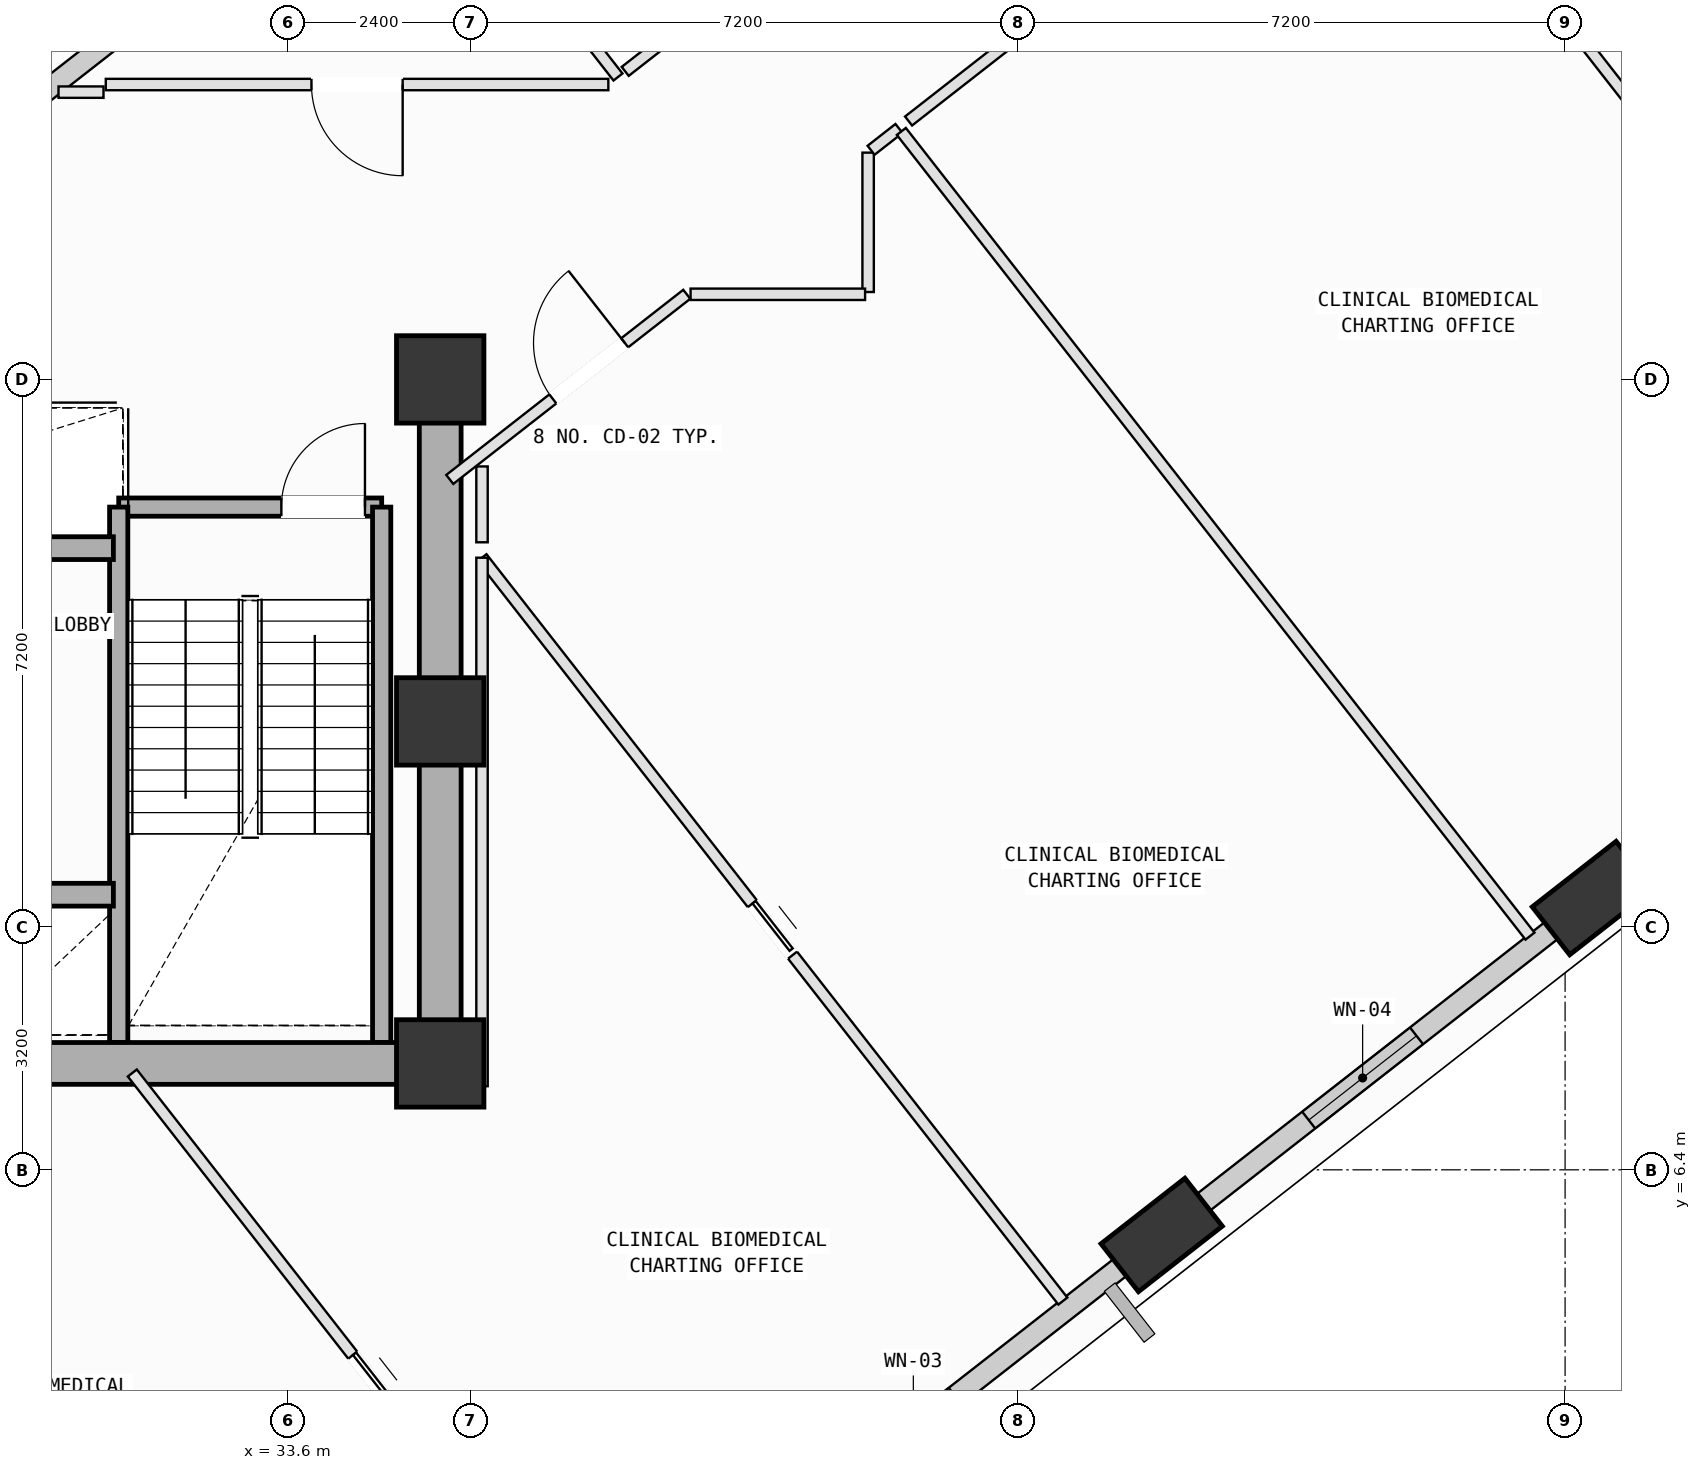
"""IFC4 building model, lengths in metres.
Left out: names, types, materials, properties, quantities, classifications, styles, units other than length and angle.
Written with IfcOpenShell. Run it as: python <this file> out.ifc"""

import sys

from ifc_helpers import new_model, si_unit, direction, frame, frame_2d, origin, origin_2d, place, context, subcontext, project, spatial, rectangle, extrude, element, fill, save


model = new_model("IFC4")
c1 = context("Model", 3, precision=1e-05, world=origin(), true_north=direction((0.0, 1.0)))
c2 = subcontext(c1, "Body", "Model", "MODEL_VIEW")
j1 = project(units=[si_unit("LENGTHUNIT", "METRE"), si_unit("PLANEANGLEUNIT", "RADIAN")], contexts=[c1])
p1 = place(None, origin())
s1 = spatial("IfcSite", under=j1, at=p1, CompositionType="ELEMENT")
p2 = place(p1, origin())
s2 = spatial("IfcBuilding", under=s1, at=p2, CompositionType="ELEMENT")
p3 = place(p2, frame((0.0, 0.0, 185.8)))
s3 = spatial("IfcBuildingStorey", under=s2, at=p3, CompositionType="ELEMENT", Elevation=185.8)
for number, where, z_axis, x_axis in (
    (1, (35.6, 7.8, 0.0), (0.0, 0.0, 1.0), (1.0, 0.0, 0.0)),
    (2, (35.6, 12.3, 0.0), (0.0, 0.0, 1.0), (1.0, 0.0, 0.0)),
    (3, (35.6, 16.8, 0.0), (0.0, 0.0, 1.0), (1.0, 0.0, 0.0)),
):
    element("IfcColumn", number, at=place(p3, frame(where, z_axis=z_axis, x_axis=x_axis)), inside=s3, PredefinedType="COLUMN", context=c2, shape_type="SweptSolid", body=[
        extrude(rectangle(XDim=1.15, YDim=1.15, at=origin_2d()), origin(), (0.0, 0.0, 1.0), 4.0),
    ])
p4 = place(p3, frame((45.092, 5.543, 0.002), z_axis=(0.079077438494, 0.048115579884, 0.99570660824), x_axis=(-0.933302489934, 0.35454015697, 0.056988940849)))
e4 = element("IfcColumn", 4, at=p4, inside=s3, PredefinedType="COLUMN", context=c2, shape_type="SweptSolid", body=[
    extrude(rectangle(XDim=1.4, YDim=0.8, at=origin_2d()), origin(), (0.0, 0.0, 1.0), 4.014),
])
p5 = place(p3, frame((50.766, 9.976, 0.002), z_axis=(0.060579626356, 0.071345282847, 0.995610345208), x_axis=(-0.997420646778, 0.042797849561, 0.057622890015)))
e5 = element("IfcColumn", 5, at=p5, inside=s3, PredefinedType="COLUMN", context=c2, shape_type="SweptSolid", body=[
    extrude(rectangle(XDim=1.4, YDim=0.8, at=origin_2d()), origin(), (0.0, 0.0, 1.0), 4.014),
])
p6 = place(p3, frame((44.847, 5.351, 0.0), z_axis=(0.0, 0.0, 1.0), x_axis=(-0.78801127006, -0.615660814294, 0.0)))
e6 = element("IfcWall", 6, at=p6, inside=s3, PredefinedType="SOLIDWALL", context=c2, shape_type="SweptSolid", body=[
    extrude(rectangle(XDim=6.214, YDim=0.28, at=frame_2d((3.107, 0.0))), origin(), (0.0, 0.0, 1.0), 3.265),
])
p7 = place(p6, frame((3.135, 0.0, 0.75)))
e7 = element("IfcOpeningElement", 7, at=p7, cuts=e6, PredefinedType="OPENING", context=c2, shape_type="SweptSolid", body=[
    extrude(rectangle(XDim=1.4, YDim=1.85, at=frame_2d((0.7, 0.925))), frame((0.0, 0.15, 0.0), z_axis=(0.0, -1.0, 0.0), x_axis=(1.0, 0.0, 0.0)), (0.0, 0.0, 1.0), 0.3),
])
p8 = place(p3, frame((50.521, 9.784, 0.0), z_axis=(0.0, 0.0, 1.0), x_axis=(-0.788024969853, -0.615643278927, 0.0)))
e8 = element("IfcWall", 8, at=p8, inside=s3, PredefinedType="SOLIDWALL", context=c2, shape_type="SweptSolid", body=[
    extrude(rectangle(XDim=6.209, YDim=0.28, at=frame_2d((3.104, 0.0))), origin(), (0.0, 0.0, 1.0), 3.265),
])
p9 = place(p8, frame((2.634, 0.0, 0.75)))
e9 = element("IfcOpeningElement", 9, at=p9, cuts=e8, PredefinedType="OPENING", context=c2, shape_type="SweptSolid", body=[
    extrude(rectangle(XDim=1.8, YDim=2.05, at=frame_2d((0.9, 1.025))), frame((0.0, 0.15, 0.0), z_axis=(0.0, -1.0, 0.0), x_axis=(1.0, 0.0, 0.0)), (0.0, 0.0, 1.0), 0.3),
])
p10 = place(p3, frame((29.667, 20.014, 0.0), z_axis=(0.0, 0.0, 1.0), x_axis=(0.788002637329, 0.615671863547, 0.0)))
e10 = element("IfcWall", 10, at=p10, inside=s3, PredefinedType="SOLIDWALL", context=c2, shape_type="SweptSolid", body=[
    extrude(rectangle(XDim=5.96, YDim=0.28, at=frame_2d((2.98, 0.0))), origin(), (0.0, 0.0, 1.0), 3.265),
])
p11 = place(p3, frame((31.37, 15.12, 0.0), z_axis=(0.0, 0.0, 1.0), x_axis=(1.0, 0.0, 0.0)))
e11 = element("IfcWall", 11, at=p11, inside=s3, PredefinedType="SOLIDWALL", context=c2, shape_type="SweptSolid", body=[
    extrude(rectangle(XDim=3.46, YDim=0.24, at=frame_2d((1.73, 0.0))), origin(), (0.0, 0.0, 1.0), 3.78),
])
p12 = place(p11, frame((2.14, 0.0, 0.0)))
e12 = element("IfcOpeningElement", 12, at=p12, cuts=e11, PredefinedType="OPENING", context=c2, shape_type="SweptSolid", body=[
    extrude(rectangle(XDim=1.1, YDim=2.15, at=frame_2d((0.55, 1.075))), frame((0.0, 0.13, 0.0), z_axis=(0.0, -1.0, 0.0), x_axis=(1.0, 0.0, 0.0)), (0.0, 0.0, 1.0), 0.26),
])
for number, where, z_axis, x_axis in (
    (13, (34.83, 15.12, 0.0), (0.0, 0.0, 1.0), (0.0, -1.0, 0.0)),
    (14, (31.37, 8.075, 0.0), (0.0, 0.0, 1.0), (0.0, 1.0, 0.0)),
):
    element("IfcWall", number, at=place(p3, frame(where, z_axis=z_axis, x_axis=x_axis)), inside=s3, PredefinedType="SOLIDWALL", context=c2, shape_type="SweptSolid", body=[
        extrude(rectangle(XDim=7.045, YDim=0.24, at=frame_2d((3.522, 0.0))), origin(), (0.0, 0.0, 1.0), 3.78),
    ])
p13 = place(p3, frame((24.8, 7.8, 0.0), z_axis=(0.0, 0.0, 1.0), x_axis=(1.0, 0.0, 0.0)))
e15 = element("IfcWall", 15, at=p13, inside=s3, PredefinedType="SHEAR", context=c2, shape_type="SweptSolid", body=[
    extrude(rectangle(XDim=10.8, YDim=0.55, at=frame_2d((5.4, 0.0))), origin(), (0.0, 0.0, 1.0), 3.78),
])
p14 = place(p3, frame((35.6, 7.8, 0.0), z_axis=(0.0, 0.0, 1.0), x_axis=(0.0, 1.0, 0.0)))
e16 = element("IfcWall", 16, at=p14, inside=s3, PredefinedType="SHEAR", context=c2, shape_type="SweptSolid", body=[
    extrude(rectangle(XDim=9.0, YDim=0.55, at=frame_2d((4.5, 0.0))), origin(), (0.0, 0.0, 1.0), 3.78),
])
p15 = place(p3, frame((29.6, 10.02, 0.0), z_axis=(0.0, 0.0, 1.0), x_axis=(1.0, 0.0, 0.0)))
e17 = element("IfcWall", 17, at=p15, inside=s3, PredefinedType="SOLIDWALL", context=c2, shape_type="SweptSolid", body=[
    extrude(rectangle(XDim=1.7, YDim=0.3, at=frame_2d((0.85, 0.0))), origin(), (0.0, 0.0, 1.0), 3.78),
])
p16 = place(p3, frame((25.85, 14.58, 0.0), z_axis=(0.0, 0.0, 1.0), x_axis=(1.0, 0.0, 0.0)))
e18 = element("IfcWall", 18, at=p16, inside=s3, PredefinedType="SOLIDWALL", context=c2, shape_type="SweptSolid", body=[
    extrude(rectangle(XDim=5.45, YDim=0.3, at=frame_2d((2.725, 0.0))), origin(), (0.0, 0.0, 1.0), 3.78),
])
p17 = place(p16, frame((0.34, 0.0, 0.0)))
e19 = element("IfcOpeningElement", 19, at=p17, cuts=e18, PredefinedType="OPENING", context=c2, shape_type="SweptSolid", body=[
    extrude(rectangle(XDim=1.12, YDim=2.15, at=frame_2d((0.56, 1.075))), frame((0.0, 0.16, 0.0), z_axis=(0.0, -1.0, 0.0), x_axis=(1.0, 0.0, 0.0)), (0.0, 0.0, 1.0), 0.32),
])
p18 = place(p16, frame((2.24, 0.0, 0.0)))
e20 = element("IfcOpeningElement", 20, at=p18, cuts=e18, PredefinedType="OPENING", context=c2, shape_type="SweptSolid", body=[
    extrude(rectangle(XDim=1.12, YDim=2.15, at=frame_2d((0.56, 1.075))), frame((0.0, 0.16, 0.0), z_axis=(0.0, -1.0, 0.0), x_axis=(1.0, 0.0, 0.0)), (0.0, 0.0, 1.0), 0.32),
])
p19 = place(p3, frame((31.625, -4.833, 0.0), z_axis=(0.0, 0.0, 1.0), x_axis=(-0.615629988963, 0.788035352436, 0.0)))
e21 = element("IfcWall", 21, at=p19, inside=s3, PredefinedType="PARTITIONING", context=c2, shape_type="SweptSolid", body=[
    extrude(rectangle(XDim=13.485, YDim=0.15, at=frame_2d((6.743, 0.0))), origin(), (0.0, 0.0, 1.0), 3.78),
])
p20 = place(p3, frame((31.549, 7.674, 0.0), z_axis=(0.0, 0.0, 1.0), x_axis=(0.615635907998, -0.788030728324, 0.0)))
e22 = element("IfcWall", 22, at=p20, inside=s3, PredefinedType="PARTITIONING", context=c2, shape_type="SweptSolid", body=[
    extrude(rectangle(XDim=9.902, YDim=0.15, at=frame_2d((4.951, 0.0))), origin(), (0.0, 0.0, 1.0), 3.78),
])
p21 = place(p20, frame((4.711, 0.0, 0.0)))
e23 = element("IfcOpeningElement", 23, at=p21, cuts=e22, PredefinedType="OPENING", context=c2, shape_type="SweptSolid", body=[
    extrude(rectangle(XDim=0.86, YDim=2.06, at=frame_2d((0.43, 1.03))), frame((0.0, 0.085, 0.0), z_axis=(0.0, -1.0, 0.0), x_axis=(1.0, 0.0, 0.0)), (0.0, 0.0, 1.0), 0.17),
])
p22 = place(p3, frame((36.15, 14.454, 0.0), z_axis=(0.0, 0.0, 1.0), x_axis=(0.615678011818, -0.787997833604, 0.0)))
e24 = element("IfcWall", 24, at=p22, inside=s3, PredefinedType="PARTITIONING", context=c2, shape_type="SweptSolid", body=[
    extrude(rectangle(XDim=12.413, YDim=0.15, at=frame_2d((6.206, 0.0))), origin(), (0.0, 0.0, 1.0), 3.78),
])
p23 = place(p22, frame((5.776, 0.0, 0.0)))
e25 = element("IfcOpeningElement", 25, at=p23, cuts=e24, PredefinedType="OPENING", context=c2, shape_type="SweptSolid", body=[
    extrude(rectangle(XDim=0.86, YDim=2.06, at=frame_2d((0.43, 1.03))), frame((0.0, 0.085, 0.0), z_axis=(0.0, -1.0, 0.0), x_axis=(1.0, 0.0, 0.0)), (0.0, 0.0, 1.0), 0.17),
])
p24 = place(p3, frame((35.6, 7.5, 0.0), z_axis=(0.0, 0.0, 1.0), x_axis=(1.0, 0.0, 0.0)))
e26 = element("IfcWall", 26, at=p24, inside=s3, PredefinedType="PARTITIONING", context=c2, shape_type="SweptSolid", body=[
    extrude(rectangle(XDim=0.55, YDim=0.15, at=frame_2d((0.275, 0.0))), origin(), (0.0, 0.0, 1.0), 3.78),
])
p25 = place(p3, frame((36.15, 7.5, 0.0), z_axis=(0.0, 0.0, 1.0), x_axis=(0.0, 1.0, 0.0)))
e27 = element("IfcWall", 27, at=p25, inside=s3, PredefinedType="PARTITIONING", context=c2, shape_type="SweptSolid", body=[
    extrude(rectangle(XDim=6.954, YDim=0.15, at=frame_2d((3.477, 0.0))), origin(), (0.0, 0.0, 1.0), 3.315),
])
p26 = place(p3, frame((41.23, 17.95, 0.0), z_axis=(0.0, 0.0, 1.0), x_axis=(0.0, 1.0, 0.0)))
e28 = element("IfcWall", 28, at=p26, inside=s3, PredefinedType="PARTITIONING", context=c2, shape_type="SweptSolid", body=[
    extrude(rectangle(XDim=1.834, YDim=0.15, at=frame_2d((0.917, 0.0))), origin(), (0.0, 0.0, 1.0), 3.78),
])
p27 = place(p3, frame((41.269, 19.815, 0.0), z_axis=(0.0, 0.0, 1.0), x_axis=(0.787571341055, 0.616223484418, 0.0)))
e29 = element("IfcWall", 29, at=p27, inside=s3, PredefinedType="PARTITIONING", context=c2, shape_type="SweptSolid", body=[
    extrude(rectangle(XDim=0.466, YDim=0.15, at=frame_2d((0.233, 0.0))), origin(), (0.0, 0.0, 1.0), 3.065),
])
p28 = place(p3, frame((41.667, 20.063, 0.0), z_axis=(0.0, 0.0, 1.0), x_axis=(0.615607368114, -0.788053023802, 0.0)))
e30 = element("IfcWall", 30, at=p28, inside=s3, PredefinedType="PARTITIONING", context=c2, shape_type="SweptSolid", body=[
    extrude(rectangle(XDim=13.436, YDim=0.15, at=frame_2d((6.718, 0.0))), origin(), (0.0, 0.0, 1.0), 3.78),
])
p29 = place(p3, frame((45.77, 5.781, 0.0), z_axis=(0.0, 0.0, 1.0), x_axis=(-0.787946046354, -0.615744287863, 0.0)))
e31 = element("IfcWall", 31, at=p29, inside=s3, PredefinedType="PARTITIONING", context=c2, shape_type="SweptSolid", body=[
    extrude(rectangle(XDim=0.992, YDim=0.15, at=frame_2d((0.496, 0.0))), origin(), (0.0, 0.0, 1.0), 3.265),
])
p30 = place(p3, frame((36.15, 14.657, 0.0), z_axis=(0.0, 0.0, 1.0), x_axis=(0.0, 1.0, 0.0)))
e32 = element("IfcWall", 32, at=p30, inside=s3, PredefinedType="PARTITIONING", context=c2, shape_type="SweptSolid", body=[
    extrude(rectangle(XDim=0.998, YDim=0.15, at=frame_2d((0.499, 0.0))), origin(), (0.0, 0.0, 1.0), 3.78),
])
p31 = place(p3, frame((35.726, 15.484, 0.0), z_axis=(0.0, 0.0, 1.0), x_axis=(0.788004728752, 0.615669186711, 0.0)))
e33 = element("IfcWall", 33, at=p31, inside=s3, PredefinedType="PARTITIONING", context=c2, shape_type="SweptSolid", body=[
    extrude(rectangle(XDim=3.957, YDim=0.15, at=frame_2d((1.979, 0.0))), origin(), (0.0, 0.0, 1.0), 3.78),
])
p32 = place(p31, frame((1.72, 0.0, 0.0)))
e34 = element("IfcOpeningElement", 34, at=p32, cuts=e33, PredefinedType="OPENING", context=c2, shape_type="SweptSolid", body=[
    extrude(rectangle(XDim=1.2, YDim=2.15, at=frame_2d((0.6, 1.075))), frame((0.0, 0.085, 0.0), z_axis=(0.0, -1.0, 0.0), x_axis=(1.0, 0.0, 0.0)), (0.0, 0.0, 1.0), 0.17),
])
p33 = place(p3, frame((38.894, 17.92, 0.0), z_axis=(0.0, 0.0, 1.0), x_axis=(1.0, 0.0, 0.0)))
e35 = element("IfcWall", 35, at=p33, inside=s3, PredefinedType="PARTITIONING", context=c2, shape_type="SweptSolid", body=[
    extrude(rectangle(XDim=2.296, YDim=0.15, at=frame_2d((1.148, 0.0))), origin(), (0.0, 0.0, 1.0), 3.78),
])
p34 = place(p3, frame((41.762, 20.2, 0.0), z_axis=(0.0, 0.0, 1.0), x_axis=(0.78801177859, 0.615660163404, 0.0)))
e36 = element("IfcWall", 36, at=p34, inside=s3, PredefinedType="PARTITIONING", context=c2, shape_type="SweptSolid", body=[
    extrude(rectangle(XDim=7.641, YDim=0.15, at=frame_2d((3.82, 0.0))), origin(), (0.0, 0.0, 1.0), 3.065),
])
p35 = place(p34, frame((3.22, 0.0, 0.0)))
e37 = element("IfcOpeningElement", 37, at=p35, cuts=e36, PredefinedType="OPENING", context=c2, shape_type="SweptSolid", body=[
    extrude(rectangle(XDim=1.2, YDim=2.15, at=frame_2d((0.6, 1.075))), frame((0.0, 0.085, 0.0), z_axis=(0.0, -1.0, 0.0), x_axis=(1.0, 0.0, 0.0)), (0.0, 0.0, 1.0), 0.17),
])
p36 = place(p3, frame((47.783, 24.904, 0.0), z_axis=(0.0, 0.0, 1.0), x_axis=(0.615629988963, -0.788035352436, 0.0)))
e38 = element("IfcWall", 38, at=p36, inside=s3, PredefinedType="PARTITIONING", context=c2, shape_type="SweptSolid", body=[
    extrude(rectangle(XDim=13.485, YDim=0.15, at=frame_2d((6.743, 0.0))), origin(), (0.0, 0.0, 1.0), 3.78),
])
p37 = place(p3, frame((51.442, 10.213, 0.0), z_axis=(0.0, 0.0, 1.0), x_axis=(-0.787702718668, -0.616055538895, 0.0)))
e39 = element("IfcWall", 39, at=p37, inside=s3, PredefinedType="PARTITIONING", context=c2, shape_type="SweptSolid", body=[
    extrude(rectangle(XDim=0.99, YDim=0.15, at=frame_2d((0.495, 0.0))), origin(), (0.0, 0.0, 1.0), 3.265),
])
p38 = place(p3, frame((29.364, 20.476, 0.0), z_axis=(0.0, 0.0, 1.0), x_axis=(0.788027038921, 0.615640630505, 0.0)))
e40 = element("IfcWall", 40, at=p38, inside=s3, PredefinedType="PARTITIONING", context=c2, shape_type="SweptSolid", body=[
    extrude(rectangle(XDim=6.944, YDim=0.15, at=frame_2d((3.472, 0.0))), origin(), (0.0, 0.0, 1.0), 3.78),
])
p39 = place(p3, frame((35.246, 24.227, 0.0), z_axis=(0.0, 0.0, 1.0), x_axis=(0.615519498699, -0.78812165731, 0.0)))
e41 = element("IfcWall", 41, at=p39, inside=s3, PredefinedType="PARTITIONING", context=c2, shape_type="SweptSolid", body=[
    extrude(rectangle(XDim=4.375, YDim=0.15, at=frame_2d((2.188, 0.0))), origin(), (0.0, 0.0, 1.0), 3.78),
])
p40 = place(p3, frame((37.812, 20.68, 0.0), z_axis=(0.0, 0.0, 1.0), x_axis=(-1.0, 0.0, 0.0)))
e42 = element("IfcWall", 42, at=p40, inside=s3, PredefinedType="PARTITIONING", context=c2, shape_type="SweptSolid", body=[
    extrude(rectangle(XDim=6.612, YDim=0.15, at=frame_2d((3.306, 0.0))), origin(), (0.0, 0.0, 1.0), 3.415),
])
p41 = place(p40, frame((2.706, 0.0, 0.0)))
e43 = element("IfcOpeningElement", 43, at=p41, cuts=e42, PredefinedType="OPENING", context=c2, shape_type="SweptSolid", body=[
    extrude(rectangle(XDim=1.2, YDim=2.15, at=frame_2d((0.6, 1.075))), frame((0.0, 0.085, 0.0), z_axis=(0.0, -1.0, 0.0), x_axis=(1.0, 0.0, 0.0)), (0.0, 0.0, 1.0), 0.17),
])
p42 = place(p3, frame((31.17, 20.58, 0.0), z_axis=(0.0, 0.0, 1.0), x_axis=(-1.0, 0.0, 0.0)))
e44 = element("IfcWall", 44, at=p42, inside=s3, PredefinedType="PARTITIONING", context=c2, shape_type="SweptSolid", body=[
    extrude(rectangle(XDim=0.592, YDim=0.15, at=frame_2d((0.296, 0.0))), origin(), (0.0, 0.0, 1.0), 3.78),
])
p43 = place(p3, frame((46.566, 27.519, 0.0), z_axis=(0.0, 0.0, 1.0), x_axis=(-0.788006255186, -0.615667232998, 0.0)))
e45 = element("IfcWall", 45, at=p43, inside=s3, PredefinedType="PARTITIONING", context=c2, shape_type="SweptSolid", body=[
    extrude(rectangle(XDim=10.827, YDim=0.15, at=frame_2d((5.414, 0.0))), origin(), (0.0, 0.0, 1.0), 3.065),
])
p44 = place(p43, frame((4.814, 0.0, 0.0)))
e46 = element("IfcOpeningElement", 46, at=p44, cuts=e45, PredefinedType="OPENING", context=c2, shape_type="SweptSolid", body=[
    extrude(rectangle(XDim=1.2, YDim=2.15, at=frame_2d((0.6, 1.075))), frame((0.0, 0.085, 0.0), z_axis=(0.0, -1.0, 0.0), x_axis=(1.0, 0.0, 0.0)), (0.0, 0.0, 1.0), 0.17),
])
p45 = place(p9, origin())
e47 = element("IfcWindow", 47, at=p45, inside=s3, PartitioningType="SINGLE_PANEL", PredefinedType="WINDOW", context=c2, shape_type="SweptSolid", body=[
    extrude(rectangle(XDim=1.8, YDim=2.05, at=frame_2d((0.9, 1.025))), frame((0.0, 0.03, 0.0), z_axis=(0.0, -1.0, 0.0), x_axis=(1.0, 0.0, 0.0)), (0.0, 0.0, 1.0), 0.06),
])
fill(e9, e47)
p46 = place(p12, origin())
e48 = element("IfcDoor", 48, at=p46, inside=s3, OperationType="SINGLE_SWING_RIGHT", PredefinedType="DOOR", context=c2, shape_type="SweptSolid", body=[
    extrude(rectangle(XDim=1.1, YDim=2.15, at=frame_2d((0.55, 1.075))), frame((0.0, 0.025, 0.0), z_axis=(0.0, -1.0, 0.0), x_axis=(1.0, 0.0, 0.0)), (0.0, 0.0, 1.0), 0.05),
])
fill(e12, e48)
p47 = place(p32, origin())
e49 = element("IfcDoor", 49, at=p47, inside=s3, OperationType="SINGLE_SWING_RIGHT", PredefinedType="DOOR", context=c2, shape_type="SweptSolid", body=[
    extrude(rectangle(XDim=1.2, YDim=2.15, at=frame_2d((0.6, 1.075))), frame((0.0, 0.025, 0.0), z_axis=(0.0, -1.0, 0.0), x_axis=(1.0, 0.0, 0.0)), (0.0, 0.0, 1.0), 0.05),
])
fill(e34, e49)
p48 = place(p41, origin())
e50 = element("IfcDoor", 50, at=p48, inside=s3, OperationType="SINGLE_SWING_LEFT", PredefinedType="DOOR", context=c2, shape_type="SweptSolid", body=[
    extrude(rectangle(XDim=1.2, YDim=2.15, at=frame_2d((0.6, 1.075))), frame((0.0, 0.025, 0.0), z_axis=(0.0, -1.0, 0.0), x_axis=(1.0, 0.0, 0.0)), (0.0, 0.0, 1.0), 0.05),
])
fill(e43, e50)
p49 = place(p23, origin())
e51 = element("IfcDoor", 51, at=p49, inside=s3, OperationType="SLIDING_TO_LEFT", PredefinedType="DOOR", context=c2, shape_type="SweptSolid", body=[
    extrude(rectangle(XDim=0.86, YDim=2.06, at=frame_2d((0.43, 1.03))), frame((0.0, 0.025, 0.0), z_axis=(0.0, -1.0, 0.0), x_axis=(1.0, 0.0, 0.0)), (0.0, 0.0, 1.0), 0.05),
])
fill(e25, e51)
p50 = place(p21, origin())
e52 = element("IfcDoor", 52, at=p50, inside=s3, OperationType="SLIDING_TO_LEFT", PredefinedType="DOOR", context=c2, shape_type="SweptSolid", body=[
    extrude(rectangle(XDim=0.86, YDim=2.06, at=frame_2d((0.43, 1.03))), frame((0.0, 0.025, 0.0), z_axis=(0.0, -1.0, 0.0), x_axis=(1.0, 0.0, 0.0)), (0.0, 0.0, 1.0), 0.05),
])
fill(e23, e52)
save(model, sys.argv[1])
